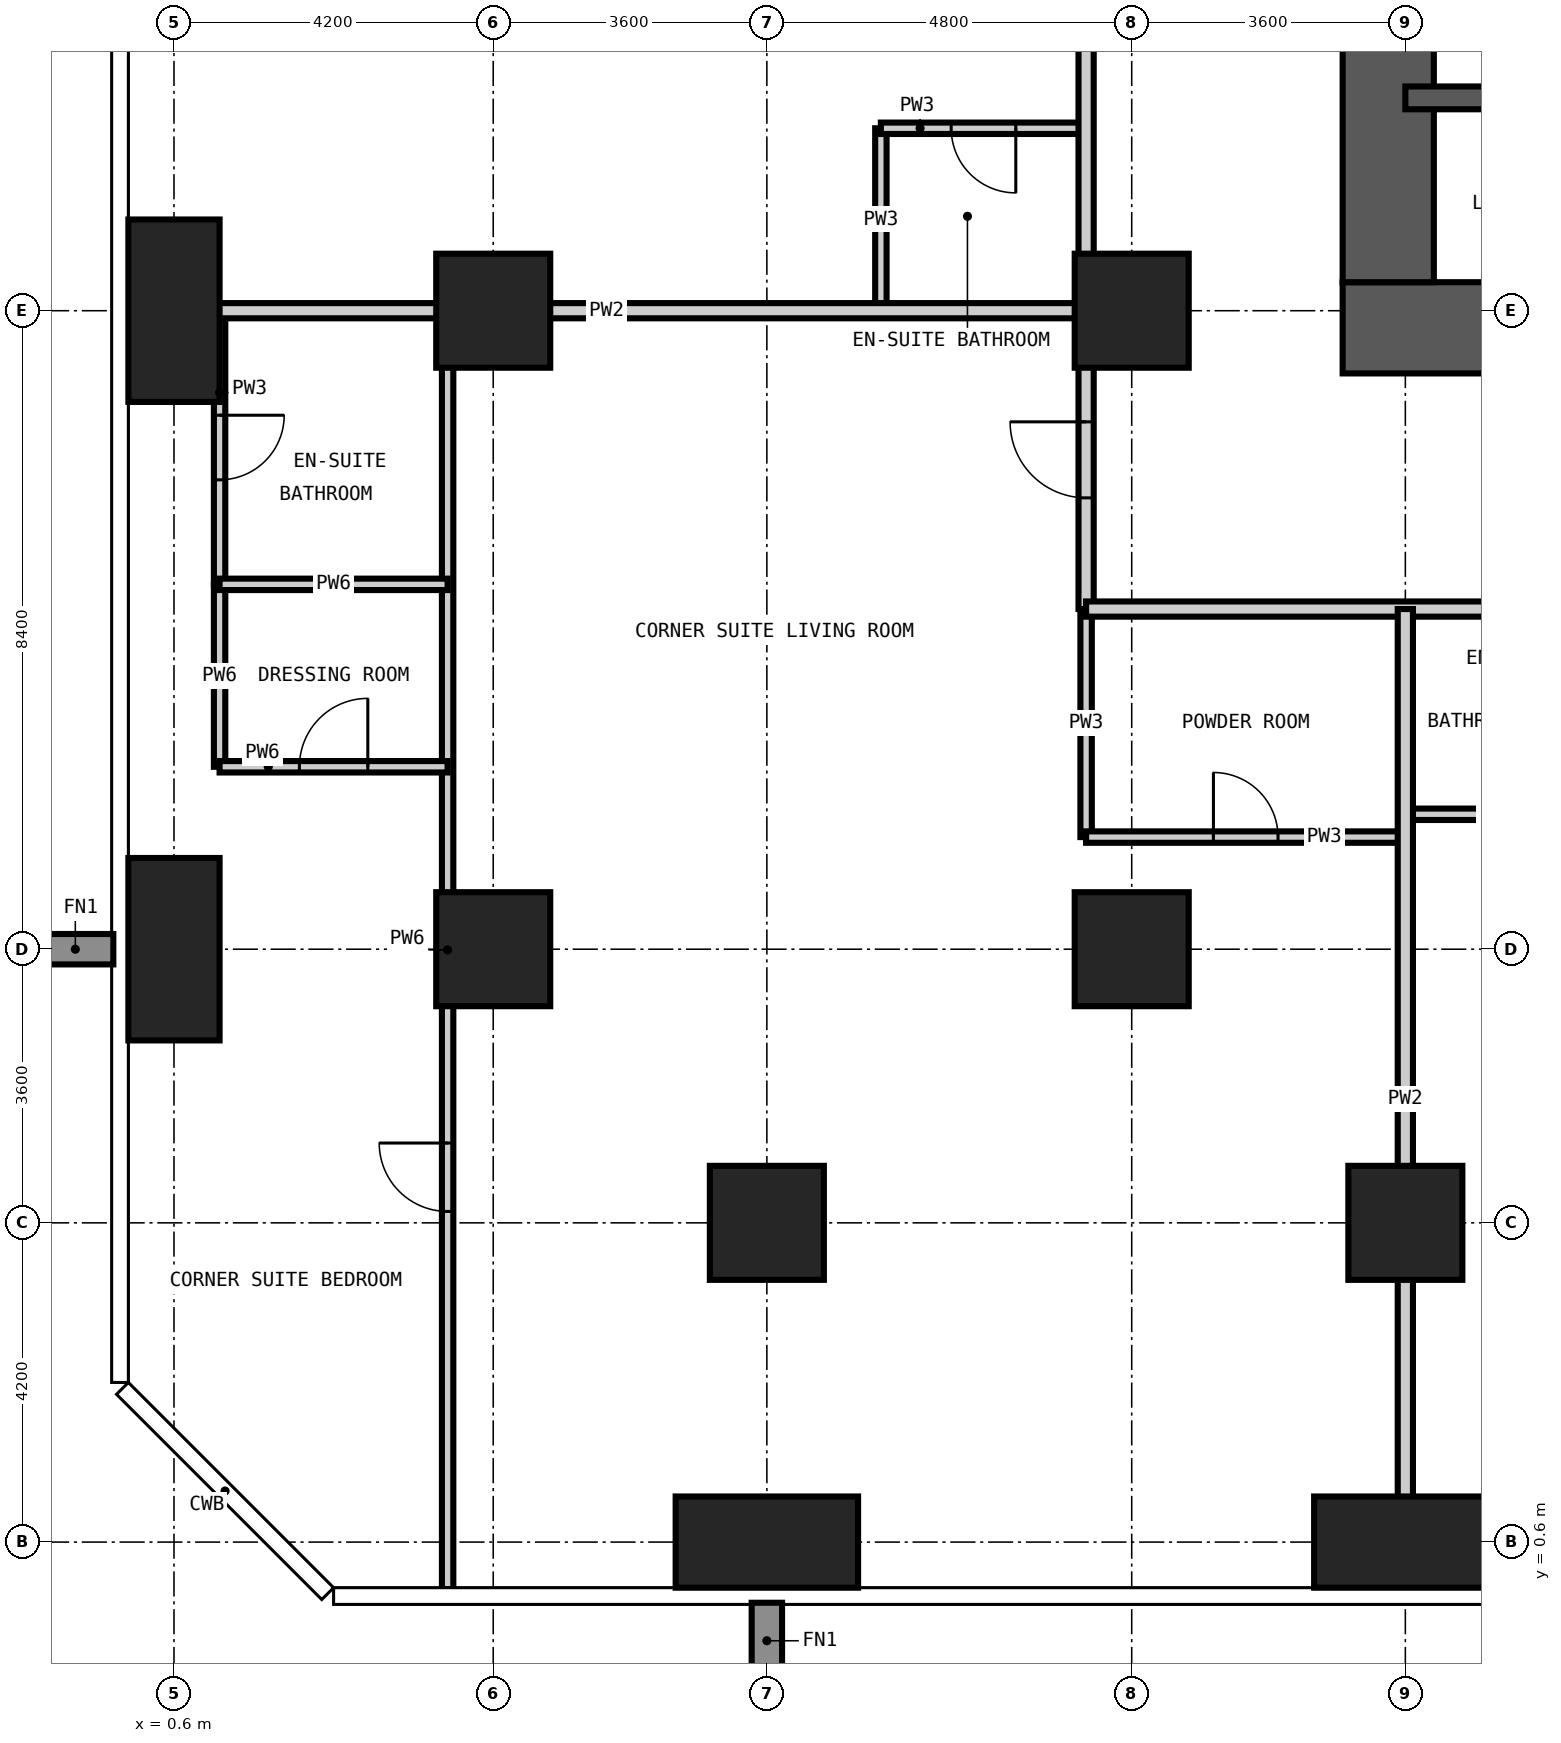
"""IFC4 building model, lengths in metres.
Left out: names, types, materials, properties, quantities, classifications, styles, units other than length and angle.
Written with IfcOpenShell. Run it as: python <this file> out.ifc"""

import sys

from ifc_helpers import new_model, si_unit, direction, frame, frame_2d, origin, origin_2d, place, context, subcontext, project, spatial, rectangle, extrude, element, fill, save


model = new_model("IFC4")
c1 = context("Model", 3, precision=1e-05, world=origin(), true_north=direction((0.0, 1.0)))
c2 = subcontext(c1, "Body", "Model", "MODEL_VIEW")
j1 = project(units=[si_unit("LENGTHUNIT", "METRE"), si_unit("PLANEANGLEUNIT", "RADIAN")], contexts=[c1])
p1 = place(None, origin())
s1 = spatial("IfcSite", under=j1, at=p1, CompositionType="ELEMENT")
p2 = place(p1, origin())
s2 = spatial("IfcBuilding", under=s1, at=p2, CompositionType="ELEMENT")
p3 = place(p2, frame((0.0, 0.0, 111.6)))
s3 = spatial("IfcBuildingStorey", under=s2, at=p3, CompositionType="ELEMENT", Elevation=111.6)
for number, where, z_axis, x_axis in (
    (1, (0.6, 8.4, -0.35), (0.0, 0.0, 1.0), (1.0, 0.0, 0.0)),
    (2, (0.6, 16.8, -0.35), (0.0, 0.0, 1.0), (1.0, 0.0, 0.0)),
):
    element("IfcColumn", number, at=place(p3, frame(where, z_axis=z_axis, x_axis=x_axis)), inside=s3, PredefinedType="COLUMN", context=c2, shape_type="SweptSolid", body=[
        extrude(rectangle(XDim=1.2, YDim=2.4, at=origin_2d()), origin(), (0.0, 0.0, 1.0), 3.6),
    ])
for number, where, z_axis, x_axis in (
    (3, (4.8, 8.4, -0.35), (0.0, 0.0, 1.0), (1.0, 0.0, 0.0)),
    (4, (4.8, 16.8, -0.35), (0.0, 0.0, 1.0), (1.0, 0.0, 0.0)),
):
    element("IfcColumn", number, at=place(p3, frame(where, z_axis=z_axis, x_axis=x_axis)), inside=s3, PredefinedType="COLUMN", context=c2, shape_type="SweptSolid", body=[
        extrude(rectangle(XDim=1.5, YDim=1.5, at=origin_2d()), origin(), (0.0, 0.0, 1.0), 3.6),
    ])
p4 = place(p3, frame((8.4, 0.6, -0.35), z_axis=(0.0, 0.0, 1.0), x_axis=(1.0, 0.0, 0.0)))
e5 = element("IfcColumn", 5, at=p4, inside=s3, PredefinedType="COLUMN", context=c2, shape_type="SweptSolid", body=[
    extrude(rectangle(XDim=2.4, YDim=1.2, at=origin_2d()), origin(), (0.0, 0.0, 1.0), 3.6),
])
for number, where, z_axis, x_axis in (
    (6, (8.4, 4.8, -0.35), (0.0, 0.0, 1.0), (1.0, 0.0, 0.0)),
    (7, (13.2, 8.4, -0.35), (0.0, 0.0, 1.0), (1.0, 0.0, 0.0)),
    (8, (13.2, 16.8, -0.35), (0.0, 0.0, 1.0), (1.0, 0.0, 0.0)),
):
    element("IfcColumn", number, at=place(p3, frame(where, z_axis=z_axis, x_axis=x_axis)), inside=s3, PredefinedType="COLUMN", context=c2, shape_type="SweptSolid", body=[
        extrude(rectangle(XDim=1.5, YDim=1.5, at=origin_2d()), origin(), (0.0, 0.0, 1.0), 3.6),
    ])
p5 = place(p3, frame((16.8, 0.6, -0.35), z_axis=(0.0, 0.0, 1.0), x_axis=(1.0, 0.0, 0.0)))
e9 = element("IfcColumn", 9, at=p5, inside=s3, PredefinedType="COLUMN", context=c2, shape_type="SweptSolid", body=[
    extrude(rectangle(XDim=2.4, YDim=1.2, at=origin_2d()), origin(), (0.0, 0.0, 1.0), 3.6),
])
p6 = place(p3, frame((16.8, 4.8, -0.35), z_axis=(0.0, 0.0, 1.0), x_axis=(1.0, 0.0, 0.0)))
e10 = element("IfcColumn", 10, at=p6, inside=s3, PredefinedType="COLUMN", context=c2, shape_type="SweptSolid", body=[
    extrude(rectangle(XDim=1.5, YDim=1.5, at=origin_2d()), origin(), (0.0, 0.0, 1.0), 3.6),
])
p7 = place(p3, frame((15.975, 16.575, -0.35), z_axis=(0.0, 0.0, 1.0), x_axis=(1.0, 0.0, 0.0)))
e11 = element("IfcWall", 11, at=p7, inside=s3, PredefinedType="SHEAR", context=c2, shape_type="SweptSolid", body=[
    extrude(rectangle(XDim=26.85, YDim=1.2, at=frame_2d((13.425, 0.0))), origin(), (0.0, 0.0, 1.0), 3.6),
])
p8 = place(p7, frame((12.925, 0.0, 0.35)))
e12 = element("IfcOpeningElement", 12, at=p8, cuts=e11, PredefinedType="OPENING", context=c2, shape_type="SweptSolid", body=[
    extrude(rectangle(XDim=1.0, YDim=2.1, at=frame_2d((0.5, 1.05))), frame((0.0, 0.61, 0.0), z_axis=(0.0, -1.0, 0.0), x_axis=(1.0, 0.0, 0.0)), (0.0, 0.0, 1.0), 1.22),
])
p9 = place(p7, frame((19.225, 0.0, 0.35)))
e13 = element("IfcOpeningElement", 13, at=p9, cuts=e11, PredefinedType="OPENING", context=c2, shape_type="SweptSolid", body=[
    extrude(rectangle(XDim=1.0, YDim=2.1, at=frame_2d((0.5, 1.05))), frame((0.0, 0.61, 0.0), z_axis=(0.0, -1.0, 0.0), x_axis=(1.0, 0.0, 0.0)), (0.0, 0.0, 1.0), 1.22),
])
p10 = place(p3, frame((16.575, 41.625, -0.35), z_axis=(0.0, 0.0, 1.0), x_axis=(0.0, -1.0, 0.0)))
e14 = element("IfcWall", 14, at=p10, inside=s3, PredefinedType="SHEAR", context=c2, shape_type="SweptSolid", body=[
    extrude(rectangle(XDim=24.45, YDim=1.2, at=frame_2d((12.225, 0.0))), origin(), (0.0, 0.0, 1.0), 3.6),
])
p11 = place(p10, frame((11.325, 0.0, 0.35)))
e15 = element("IfcOpeningElement", 15, at=p11, cuts=e14, PredefinedType="OPENING", context=c2, shape_type="SweptSolid", body=[
    extrude(rectangle(XDim=1.8, YDim=2.2, at=frame_2d((0.9, 1.1))), frame((0.0, 0.61, 0.0), z_axis=(0.0, -1.0, 0.0), x_axis=(1.0, 0.0, 0.0)), (0.0, 0.0, 1.0), 1.22),
])
p12 = place(p10, frame((20.125, 0.0, 0.35)))
e16 = element("IfcOpeningElement", 16, at=p12, cuts=e14, PredefinedType="OPENING", context=c2, shape_type="SweptSolid", body=[
    extrude(rectangle(XDim=1.0, YDim=2.1, at=frame_2d((0.5, 1.05))), frame((0.0, 0.61, 0.0), z_axis=(0.0, -1.0, 0.0), x_axis=(1.0, 0.0, 0.0)), (0.0, 0.0, 1.0), 1.22),
])
p13 = place(p10, frame((5.425, 0.0, 0.35)))
e17 = element("IfcOpeningElement", 17, at=p13, cuts=e14, PredefinedType="OPENING", context=c2, shape_type="SweptSolid", body=[
    extrude(rectangle(XDim=1.0, YDim=2.1, at=frame_2d((0.5, 1.05))), frame((0.0, 0.61, 0.0), z_axis=(0.0, -1.0, 0.0), x_axis=(1.0, 0.0, 0.0)), (0.0, 0.0, 1.0), 1.22),
])
p14 = place(p3, frame((16.8, 19.6, -0.35), z_axis=(0.0, 0.0, 1.0), x_axis=(1.0, 0.0, 0.0)))
e18 = element("IfcWall", 18, at=p14, inside=s3, PredefinedType="SHEAR", context=c2, shape_type="SweptSolid", body=[
    extrude(rectangle(XDim=8.4, YDim=0.3, at=frame_2d((4.2, 0.0))), origin(), (0.0, 0.0, 1.0), 3.6),
])
p15 = place(p3, frame((1.2, 13.2, 0.0), z_axis=(0.0, 0.0, 1.0), x_axis=(0.0, 1.0, 0.0)))
e19 = element("IfcWall", 19, at=p15, inside=s3, PredefinedType="PARTITIONING", context=c2, shape_type="SweptSolid", body=[
    extrude(rectangle(XDim=3.6, YDim=0.15, at=frame_2d((1.8, 0.0))), origin(), (0.0, 0.0, 1.0), 3.25),
])
p16 = place(p15, frame((1.375, 0.0, 0.0)))
e20 = element("IfcOpeningElement", 20, at=p16, cuts=e19, PredefinedType="OPENING", context=c2, shape_type="SweptSolid", body=[
    extrude(rectangle(XDim=0.85, YDim=2.1, at=frame_2d((0.425, 1.05))), frame((0.0, 0.085, 0.0), z_axis=(0.0, -1.0, 0.0), x_axis=(1.0, 0.0, 0.0)), (0.0, 0.0, 1.0), 0.17),
])
p17 = place(p3, frame((9.9, 16.8, 0.0), z_axis=(0.0, 0.0, 1.0), x_axis=(0.0, 1.0, 0.0)))
e21 = element("IfcWall", 21, at=p17, inside=s3, PredefinedType="PARTITIONING", context=c2, shape_type="SweptSolid", body=[
    extrude(rectangle(XDim=2.4, YDim=0.15, at=frame_2d((1.2, 0.0))), origin(), (0.0, 0.0, 1.0), 3.25),
])
p18 = place(p3, frame((12.6, 9.875, 0.0), z_axis=(0.0, 0.0, 1.0), x_axis=(0.0, 1.0, 0.0)))
e22 = element("IfcWall", 22, at=p18, inside=s3, PredefinedType="PARTITIONING", context=c2, shape_type="SweptSolid", body=[
    extrude(rectangle(XDim=3.0, YDim=0.15, at=frame_2d((1.5, 0.0))), origin(), (0.0, 0.0, 1.0), 3.25),
])
p19 = place(p3, frame((12.6, 9.875, 0.0), z_axis=(0.0, 0.0, 1.0), x_axis=(1.0, 0.0, 0.0)))
e23 = element("IfcWall", 23, at=p19, inside=s3, PredefinedType="PARTITIONING", context=c2, shape_type="SweptSolid", body=[
    extrude(rectangle(XDim=4.2, YDim=0.15, at=frame_2d((2.1, 0.0))), origin(), (0.0, 0.0, 1.0), 3.25),
])
p20 = place(p19, frame((1.675, 0.0, 0.0)))
e24 = element("IfcOpeningElement", 24, at=p20, cuts=e23, PredefinedType="OPENING", context=c2, shape_type="SweptSolid", body=[
    extrude(rectangle(XDim=0.85, YDim=2.1, at=frame_2d((0.425, 1.05))), frame((0.0, 0.085, 0.0), z_axis=(0.0, -1.0, 0.0), x_axis=(1.0, 0.0, 0.0)), (0.0, 0.0, 1.0), 0.17),
])
p21 = place(p3, frame((16.8, 10.175, 0.0), z_axis=(0.0, 0.0, 1.0), x_axis=(1.0, 0.0, 0.0)))
e25 = element("IfcWall", 25, at=p21, inside=s3, PredefinedType="PARTITIONING", context=c2, shape_type="SweptSolid", body=[
    extrude(rectangle(XDim=2.4, YDim=0.15, at=frame_2d((1.2, 0.0))), origin(), (0.0, 0.0, 1.0), 3.25),
])
p22 = place(p3, frame((9.9, 19.2, 0.0), z_axis=(0.0, 0.0, 1.0), x_axis=(1.0, 0.0, 0.0)))
e26 = element("IfcWall", 26, at=p22, inside=s3, PredefinedType="PARTITIONING", context=c2, shape_type="SweptSolid", body=[
    extrude(rectangle(XDim=2.7, YDim=0.15, at=frame_2d((1.35, 0.0))), origin(), (0.0, 0.0, 1.0), 3.25),
])
p23 = place(p22, frame((0.925, 0.0, 0.0)))
e27 = element("IfcOpeningElement", 27, at=p23, cuts=e26, PredefinedType="OPENING", context=c2, shape_type="SweptSolid", body=[
    extrude(rectangle(XDim=0.85, YDim=2.1, at=frame_2d((0.425, 1.05))), frame((0.0, 0.085, 0.0), z_axis=(0.0, -1.0, 0.0), x_axis=(1.0, 0.0, 0.0)), (0.0, 0.0, 1.0), 0.17),
])
p24 = place(p3, frame((12.6, 12.875, 0.0), z_axis=(0.0, 0.0, 1.0), x_axis=(0.0, 1.0, 0.0)))
e28 = element("IfcWall", 28, at=p24, inside=s3, PredefinedType="PARTITIONING", context=c2, shape_type="SweptSolid", body=[
    extrude(rectangle(XDim=31.85, YDim=0.2, at=frame_2d((15.925, 0.0))), origin(), (0.0, 0.0, 1.0), 3.25),
])
p25 = place(p24, frame((8.825, 0.0, 0.0)))
e29 = element("IfcOpeningElement", 29, at=p25, cuts=e28, PredefinedType="OPENING", context=c2, shape_type="SweptSolid", body=[
    extrude(rectangle(XDim=1.0, YDim=2.2, at=frame_2d((0.5, 1.1))), frame((0.0, 0.11, 0.0), z_axis=(0.0, -1.0, 0.0), x_axis=(1.0, 0.0, 0.0)), (0.0, 0.0, 1.0), 0.22),
])
p26 = place(p24, frame((17.225, 0.0, 0.0)))
e30 = element("IfcOpeningElement", 30, at=p26, cuts=e28, PredefinedType="OPENING", context=c2, shape_type="SweptSolid", body=[
    extrude(rectangle(XDim=1.0, YDim=2.2, at=frame_2d((0.5, 1.1))), frame((0.0, 0.11, 0.0), z_axis=(0.0, -1.0, 0.0), x_axis=(1.0, 0.0, 0.0)), (0.0, 0.0, 1.0), 0.22),
])
p27 = place(p24, frame((25.625, 0.0, 0.0)))
e31 = element("IfcOpeningElement", 31, at=p27, cuts=e28, PredefinedType="OPENING", context=c2, shape_type="SweptSolid", body=[
    extrude(rectangle(XDim=1.0, YDim=2.2, at=frame_2d((0.5, 1.1))), frame((0.0, 0.11, 0.0), z_axis=(0.0, -1.0, 0.0), x_axis=(1.0, 0.0, 0.0)), (0.0, 0.0, 1.0), 0.22),
])
p28 = place(p24, frame((1.463, 0.0, 0.0)))
e32 = element("IfcOpeningElement", 32, at=p28, cuts=e28, PredefinedType="OPENING", context=c2, shape_type="SweptSolid", body=[
    extrude(rectangle(XDim=1.0, YDim=2.2, at=frame_2d((0.5, 1.1))), frame((0.0, 0.11, 0.0), z_axis=(0.0, -1.0, 0.0), x_axis=(1.0, 0.0, 0.0)), (0.0, 0.0, 1.0), 0.22),
])
p29 = place(p24, frame((29.987, 0.0, 0.0)))
e33 = element("IfcOpeningElement", 33, at=p29, cuts=e28, PredefinedType="OPENING", context=c2, shape_type="SweptSolid", body=[
    extrude(rectangle(XDim=1.0, YDim=2.2, at=frame_2d((0.5, 1.1))), frame((0.0, 0.11, 0.0), z_axis=(0.0, -1.0, 0.0), x_axis=(1.0, 0.0, 0.0)), (0.0, 0.0, 1.0), 0.22),
])
p30 = place(p3, frame((45.325, 12.875, 0.0), z_axis=(0.0, 0.0, 1.0), x_axis=(-1.0, 0.0, 0.0)))
e34 = element("IfcWall", 34, at=p30, inside=s3, PredefinedType="PARTITIONING", context=c2, shape_type="SweptSolid", body=[
    extrude(rectangle(XDim=32.725, YDim=0.2, at=frame_2d((16.362, 0.0))), origin(), (0.0, 0.0, 1.0), 3.25),
])
p31 = place(p30, frame((22.625, 0.0, 0.0)))
e35 = element("IfcOpeningElement", 35, at=p31, cuts=e34, PredefinedType="OPENING", context=c2, shape_type="SweptSolid", body=[
    extrude(rectangle(XDim=1.0, YDim=2.2, at=frame_2d((0.5, 1.1))), frame((0.0, 0.11, 0.0), z_axis=(0.0, -1.0, 0.0), x_axis=(1.0, 0.0, 0.0)), (0.0, 0.0, 1.0), 0.22),
])
p32 = place(p30, frame((14.225, 0.0, 0.0)))
e36 = element("IfcOpeningElement", 36, at=p32, cuts=e34, PredefinedType="OPENING", context=c2, shape_type="SweptSolid", body=[
    extrude(rectangle(XDim=1.0, YDim=2.2, at=frame_2d((0.5, 1.1))), frame((0.0, 0.11, 0.0), z_axis=(0.0, -1.0, 0.0), x_axis=(1.0, 0.0, 0.0)), (0.0, 0.0, 1.0), 0.22),
])
p33 = place(p30, frame((5.825, 0.0, 0.0)))
e37 = element("IfcOpeningElement", 37, at=p33, cuts=e34, PredefinedType="OPENING", context=c2, shape_type="SweptSolid", body=[
    extrude(rectangle(XDim=1.0, YDim=2.2, at=frame_2d((0.5, 1.1))), frame((0.0, 0.11, 0.0), z_axis=(0.0, -1.0, 0.0), x_axis=(1.0, 0.0, 0.0)), (0.0, 0.0, 1.0), 0.22),
])
p34 = place(p3, frame((16.8, -0.018, 0.0), z_axis=(0.0, 0.0, 1.0), x_axis=(0.0, 1.0, 0.0)))
e38 = element("IfcWall", 38, at=p34, inside=s3, PredefinedType="PARTITIONING", context=c2, shape_type="SweptSolid", body=[
    extrude(rectangle(XDim=12.893, YDim=0.2, at=frame_2d((6.447, 0.0))), origin(), (0.0, 0.0, 1.0), 3.25),
])
p35 = place(p3, frame((-0.018, 16.8, 0.0), z_axis=(0.0, 0.0, 1.0), x_axis=(1.0, 0.0, 0.0)))
e39 = element("IfcWall", 39, at=p35, inside=s3, PredefinedType="PARTITIONING", context=c2, shape_type="SweptSolid", body=[
    extrude(rectangle(XDim=12.618, YDim=0.2, at=frame_2d((6.309, 0.0))), origin(), (0.0, 0.0, 1.0), 3.25),
])
p36 = place(p3, frame((1.2, 10.8, 0.0), z_axis=(0.0, 0.0, 1.0), x_axis=(0.0, 1.0, 0.0)))
e40 = element("IfcWall", 40, at=p36, inside=s3, PredefinedType="PARTITIONING", context=c2, shape_type="SweptSolid", body=[
    extrude(rectangle(XDim=2.4, YDim=0.15, at=frame_2d((1.2, 0.0))), origin(), (0.0, 0.0, 1.0), 3.25),
])
p37 = place(p3, frame((4.2, -0.018, 0.0), z_axis=(0.0, 0.0, 1.0), x_axis=(0.0, 1.0, 0.0)))
e41 = element("IfcWall", 41, at=p37, inside=s3, PredefinedType="PARTITIONING", context=c2, shape_type="SweptSolid", body=[
    extrude(rectangle(XDim=16.818, YDim=0.15, at=frame_2d((8.409, 0.0))), origin(), (0.0, 0.0, 1.0), 3.25),
])
p38 = place(p37, frame((4.968, 0.0, 0.0)))
e42 = element("IfcOpeningElement", 42, at=p38, cuts=e41, PredefinedType="OPENING", context=c2, shape_type="SweptSolid", body=[
    extrude(rectangle(XDim=0.9, YDim=2.1, at=frame_2d((0.45, 1.05))), frame((0.0, 0.085, 0.0), z_axis=(0.0, -1.0, 0.0), x_axis=(1.0, 0.0, 0.0)), (0.0, 0.0, 1.0), 0.17),
])
p39 = place(p3, frame((1.2, 10.8, 0.0), z_axis=(0.0, 0.0, 1.0), x_axis=(1.0, 0.0, 0.0)))
e43 = element("IfcWall", 43, at=p39, inside=s3, PredefinedType="PARTITIONING", context=c2, shape_type="SweptSolid", body=[
    extrude(rectangle(XDim=3.0, YDim=0.15, at=frame_2d((1.5, 0.0))), origin(), (0.0, 0.0, 1.0), 3.25),
])
p40 = place(p39, frame((1.05, 0.0, 0.0)))
e44 = element("IfcOpeningElement", 44, at=p40, cuts=e43, PredefinedType="OPENING", context=c2, shape_type="SweptSolid", body=[
    extrude(rectangle(XDim=0.9, YDim=2.1, at=frame_2d((0.45, 1.05))), frame((0.0, 0.085, 0.0), z_axis=(0.0, -1.0, 0.0), x_axis=(1.0, 0.0, 0.0)), (0.0, 0.0, 1.0), 0.17),
])
p41 = place(p3, frame((1.2, 13.2, 0.0), z_axis=(0.0, 0.0, 1.0), x_axis=(1.0, 0.0, 0.0)))
e45 = element("IfcWall", 45, at=p41, inside=s3, PredefinedType="PARTITIONING", context=c2, shape_type="SweptSolid", body=[
    extrude(rectangle(XDim=3.0, YDim=0.15, at=frame_2d((1.5, 0.0))), origin(), (0.0, 0.0, 1.0), 3.25),
])
p42 = place(p23, frame((0.85, 0.0, 0.0), z_axis=(0.0, 0.0, 1.0), x_axis=(-1.0, 0.0, 0.0)))
e46 = element("IfcDoor", 46, at=p42, inside=s3, OperationType="SINGLE_SWING_LEFT", PredefinedType="DOOR", context=c2, shape_type="SweptSolid", body=[
    extrude(rectangle(XDim=0.85, YDim=2.1, at=frame_2d((0.425, 1.05))), frame((0.0, 0.025, 0.0), z_axis=(0.0, -1.0, 0.0), x_axis=(1.0, 0.0, 0.0)), (0.0, 0.0, 1.0), 0.05),
])
fill(e27, e46)
p43 = place(p28, origin())
e47 = element("IfcDoor", 47, at=p43, inside=s3, OperationType="SINGLE_SWING_RIGHT", PredefinedType="DOOR", context=c2, shape_type="SweptSolid", body=[
    extrude(rectangle(XDim=1.0, YDim=2.2, at=frame_2d((0.5, 1.1))), frame((0.0, 0.025, 0.0), z_axis=(0.0, -1.0, 0.0), x_axis=(1.0, 0.0, 0.0)), (0.0, 0.0, 1.0), 0.05),
])
fill(e32, e47)
p44 = place(p20, origin())
e48 = element("IfcDoor", 48, at=p44, inside=s3, OperationType="SINGLE_SWING_LEFT", PredefinedType="DOOR", context=c2, shape_type="SweptSolid", body=[
    extrude(rectangle(XDim=0.85, YDim=2.1, at=frame_2d((0.425, 1.05))), frame((0.0, 0.025, 0.0), z_axis=(0.0, -1.0, 0.0), x_axis=(1.0, 0.0, 0.0)), (0.0, 0.0, 1.0), 0.05),
])
fill(e24, e48)
p45 = place(p38, origin())
e49 = element("IfcDoor", 49, at=p45, inside=s3, OperationType="SINGLE_SWING_RIGHT", PredefinedType="DOOR", context=c2, shape_type="SweptSolid", body=[
    extrude(rectangle(XDim=0.9, YDim=2.1, at=frame_2d((0.45, 1.05))), frame((0.0, 0.025, 0.0), z_axis=(0.0, -1.0, 0.0), x_axis=(1.0, 0.0, 0.0)), (0.0, 0.0, 1.0), 0.05),
])
fill(e42, e49)
p46 = place(p16, frame((0.85, 0.0, 0.0), z_axis=(0.0, 0.0, 1.0), x_axis=(-1.0, 0.0, 0.0)))
e50 = element("IfcDoor", 50, at=p46, inside=s3, OperationType="SINGLE_SWING_LEFT", PredefinedType="DOOR", context=c2, shape_type="SweptSolid", body=[
    extrude(rectangle(XDim=0.85, YDim=2.1, at=frame_2d((0.425, 1.05))), frame((0.0, 0.025, 0.0), z_axis=(0.0, -1.0, 0.0), x_axis=(1.0, 0.0, 0.0)), (0.0, 0.0, 1.0), 0.05),
])
fill(e20, e50)
p47 = place(p40, origin())
e51 = element("IfcDoor", 51, at=p47, inside=s3, OperationType="SINGLE_SWING_RIGHT", PredefinedType="DOOR", context=c2, shape_type="SweptSolid", body=[
    extrude(rectangle(XDim=0.9, YDim=2.1, at=frame_2d((0.45, 1.05))), frame((0.0, 0.025, 0.0), z_axis=(0.0, -1.0, 0.0), x_axis=(1.0, 0.0, 0.0)), (0.0, 0.0, 1.0), 0.05),
])
fill(e44, e51)
save(model, sys.argv[1])
